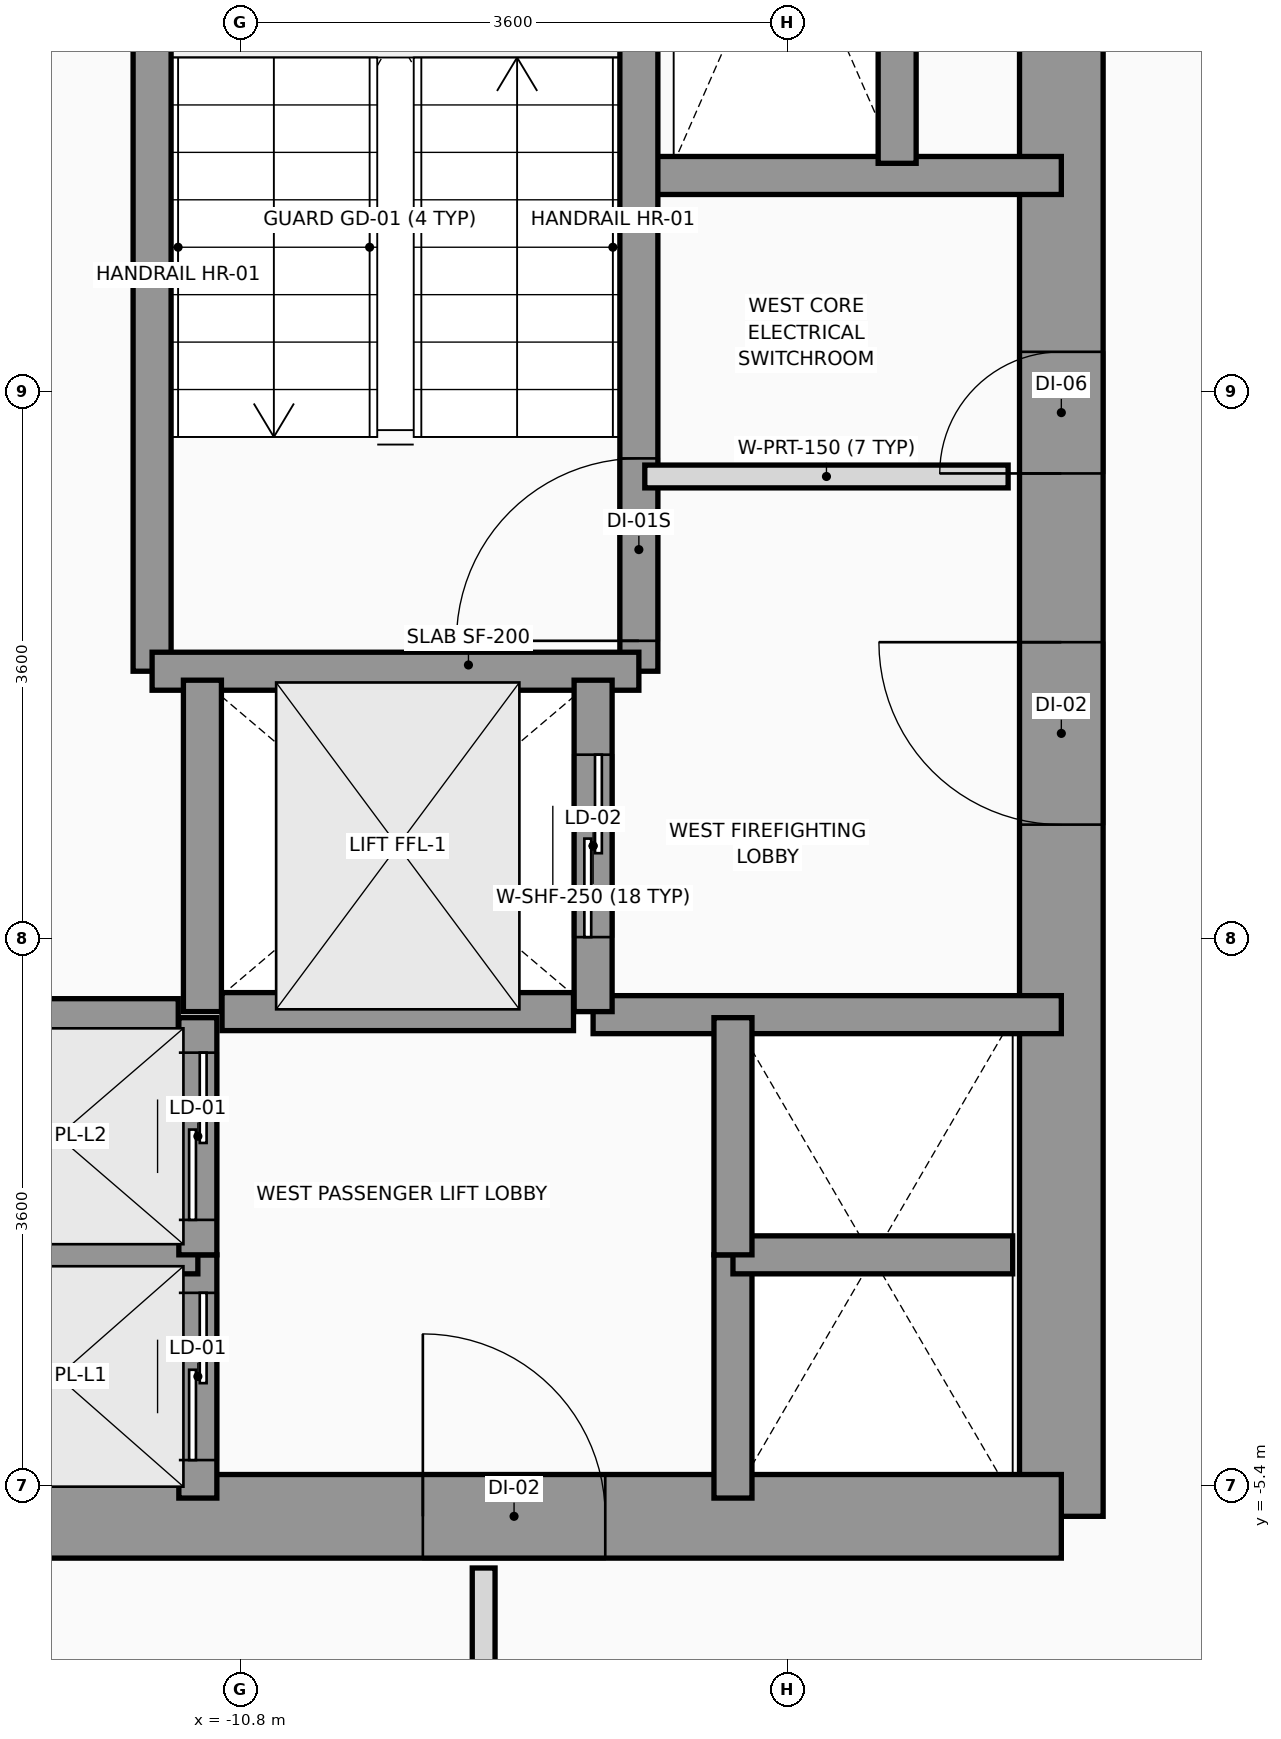
"""IFC4 building model, lengths in metres.
Left out: names, types, materials, properties, quantities, classifications, styles, units other than length and angle.
Written with IfcOpenShell. Run it as: python <this file> out.ifc"""

import sys

from ifc_helpers import new_model, si_unit, direction, frame, frame_2d, origin, place, context, subcontext, project, spatial, rectangle, extrude, source, transform, mapped, element, fill, save


model = new_model("IFC4")
c1 = context("Model", 3, precision=1e-05, world=origin(), true_north=direction((0.0, 1.0)))
c2 = subcontext(c1, "Body", "Model", "MODEL_VIEW")
j1 = project(units=[si_unit("LENGTHUNIT", "METRE"), si_unit("PLANEANGLEUNIT", "RADIAN")], contexts=[c1])
p1 = place(None, origin())
s1 = spatial("IfcSite", under=j1, at=p1, CompositionType="ELEMENT")
p2 = place(p1, origin())
s2 = spatial("IfcBuilding", under=s1, at=p2, CompositionType="ELEMENT")
p3 = place(p2, frame((0.0, 0.0, 30.6)))
s3 = spatial("IfcBuildingStorey", under=s2, at=p3, CompositionType="ELEMENT", Elevation=30.6)
p4 = place(p3, frame((-5.4, -5.6, 0.0), z_axis=(0.0, 0.0, 1.0), x_axis=(0.0, 1.0, 0.0)))
e1 = element("IfcWall", 1, at=p4, inside=s3, PredefinedType="SHEAR", context=c2, shape_type="SweptSolid", body=[
    extrude(rectangle(XDim=12.5, YDim=0.55, at=frame_2d((6.25, 0.0))), origin(), (0.0, 0.0, 1.0), 3.2),
])
p5 = place(p4, frame((4.55, 0.0, 0.0)))
e2 = element("IfcOpeningElement", 2, at=p5, cuts=e1, PredefinedType="OPENING", context=c2, shape_type="SweptSolid", body=[
    extrude(rectangle(XDim=1.2, YDim=2.2, at=frame_2d((0.6, 1.1))), frame((0.0, 0.285, 0.0), z_axis=(0.0, -1.0, 0.0), x_axis=(1.0, 0.0, 0.0)), (0.0, 0.0, 1.0), 0.57),
])
p6 = place(p4, frame((6.86, 0.0, 0.0)))
e3 = element("IfcOpeningElement", 3, at=p6, cuts=e1, PredefinedType="OPENING", context=c2, shape_type="SweptSolid", body=[
    extrude(rectangle(XDim=0.8, YDim=2.1, at=frame_2d((0.4, 1.05))), frame((0.0, 0.285, 0.0), z_axis=(0.0, -1.0, 0.0), x_axis=(1.0, 0.0, 0.0)), (0.0, 0.0, 1.0), 0.57),
])
p7 = place(p3, frame((-13.2, -5.6, 0.0), z_axis=(0.0, 0.0, 1.0), x_axis=(1.0, 0.0, 0.0)))
e4 = element("IfcWall", 4, at=p7, inside=s3, PredefinedType="SHEAR", context=c2, shape_type="SweptSolid", body=[
    extrude(rectangle(XDim=7.8, YDim=0.55, at=frame_2d((3.9, 0.0))), origin(), (0.0, 0.0, 1.0), 3.2),
])
p8 = place(p7, frame((3.6, 0.0, 0.0)))
e5 = element("IfcOpeningElement", 5, at=p8, cuts=e4, PredefinedType="OPENING", context=c2, shape_type="SweptSolid", body=[
    extrude(rectangle(XDim=1.2, YDim=2.2, at=frame_2d((0.6, 1.1))), frame((0.0, 0.285, 0.0), z_axis=(0.0, -1.0, 0.0), x_axis=(1.0, 0.0, 0.0)), (0.0, 0.0, 1.0), 0.57),
])
p9 = place(p3, frame((-8.18, 3.22, 0.0), z_axis=(0.0, 0.0, 1.0), x_axis=(1.0, 0.0, 0.0)))
e6 = element("IfcWall", 6, at=p9, inside=s3, PredefinedType="SOLIDWALL", context=c2, shape_type="SweptSolid", body=[
    extrude(rectangle(XDim=2.78, YDim=0.25, at=frame_2d((1.39, 0.0))), origin(), (0.0, 0.0, 1.0), 3.2),
])
p10 = place(p3, frame((-8.48, -2.3, 0.0), z_axis=(0.0, 0.0, 1.0), x_axis=(1.0, 0.0, 0.0)))
e7 = element("IfcWall", 7, at=p10, inside=s3, PredefinedType="SOLIDWALL", context=c2, shape_type="SweptSolid", body=[
    extrude(rectangle(XDim=3.08, YDim=0.25, at=frame_2d((1.54, 0.0))), origin(), (0.0, 0.0, 1.0), 3.2),
])
p11 = place(p3, frame((-8.179, -0.041, 0.0), z_axis=(0.0, 0.0, 1.0), x_axis=(0.0, 1.0, 0.0)))
e8 = element("IfcWall", 8, at=p11, inside=s3, PredefinedType="SOLIDWALL", context=c2, shape_type="SweptSolid", body=[
    extrude(rectangle(XDim=6.941, YDim=0.25, at=frame_2d((3.47, 0.0))), origin(), (0.0, 0.0, 1.0), 3.2),
])
p12 = place(p11, frame((0.2, 0.0, 0.0)))
e9 = element("IfcOpeningElement", 9, at=p12, cuts=e8, PredefinedType="OPENING", context=c2, shape_type="SweptSolid", body=[
    extrude(rectangle(XDim=1.2, YDim=2.2, at=frame_2d((0.6, 1.1))), frame((0.0, 0.135, 0.0), z_axis=(0.0, -1.0, 0.0), x_axis=(1.0, 0.0, 0.0)), (0.0, 0.0, 1.0), 0.27),
])
p13 = place(p3, frame((-11.381, -0.041, 0.0), z_axis=(0.0, 0.0, 1.0), x_axis=(0.0, 1.0, 0.0)))
e10 = element("IfcWall", 10, at=p13, inside=s3, PredefinedType="SOLIDWALL", context=c2, shape_type="SweptSolid", body=[
    extrude(rectangle(XDim=6.941, YDim=0.25, at=frame_2d((3.47, 0.0))), origin(), (0.0, 0.0, 1.0), 3.2),
])
p14 = place(p3, frame((-11.381, -0.041, 0.0), z_axis=(0.0, 0.0, 1.0), x_axis=(1.0, 0.0, 0.0)))
e11 = element("IfcWall", 11, at=p14, inside=s3, PredefinedType="SOLIDWALL", context=c2, shape_type="SweptSolid", body=[
    extrude(rectangle(XDim=3.202, YDim=0.25, at=frame_2d((1.601, 0.0))), origin(), (0.0, 0.0, 1.0), 3.2),
])
p15 = place(p3, frame((-11.05, -2.28, 0.0), z_axis=(0.0, 0.0, 1.0), x_axis=(0.0, 1.0, 0.0)))
e12 = element("IfcWall", 12, at=p15, inside=s3, PredefinedType="SOLIDWALL", context=c2, shape_type="SweptSolid", body=[
    extrude(rectangle(XDim=2.18, YDim=0.25, at=frame_2d((1.09, 0.0))), origin(), (0.0, 0.0, 1.0), 3.2),
])
p16 = place(p3, frame((-8.48, -2.28, 0.0), z_axis=(0.0, 0.0, 1.0), x_axis=(0.0, 1.0, 0.0)))
e13 = element("IfcWall", 13, at=p16, inside=s3, PredefinedType="SOLIDWALL", context=c2, shape_type="SweptSolid", body=[
    extrude(rectangle(XDim=2.18, YDim=0.25, at=frame_2d((1.09, 0.0))), origin(), (0.0, 0.0, 1.0), 3.2),
])
p17 = place(p16, frame((0.49, 0.0, 0.0)))
e14 = element("IfcOpeningElement", 14, at=p17, cuts=e13, PredefinedType="OPENING", context=c2, shape_type="SweptSolid", body=[
    extrude(rectangle(XDim=1.2, YDim=2.2, at=frame_2d((0.6, 1.1))), frame((0.0, 0.135, 0.0), z_axis=(0.0, -1.0, 0.0), x_axis=(1.0, 0.0, 0.0)), (0.0, 0.0, 1.0), 0.27),
])
p18 = place(p3, frame((-10.921, -2.28, 0.0), z_axis=(0.0, 0.0, 1.0), x_axis=(1.0, 0.0, 0.0)))
e15 = element("IfcWall", 15, at=p18, inside=s3, PredefinedType="SOLIDWALL", context=c2, shape_type="SweptSolid", body=[
    extrude(rectangle(XDim=2.312, YDim=0.25, at=frame_2d((1.156, 0.0))), origin(), (0.0, 0.0, 1.0), 3.2),
])
p19 = place(p3, frame((-11.08, -5.48, 0.0), z_axis=(0.0, 0.0, 1.0), x_axis=(0.0, 1.0, 0.0)))
e16 = element("IfcWall", 16, at=p19, inside=s3, PredefinedType="SOLIDWALL", context=c2, shape_type="SweptSolid", body=[
    extrude(rectangle(XDim=1.6, YDim=0.25, at=frame_2d((0.8, 0.0))), origin(), (0.0, 0.0, 1.0), 3.2),
])
p20 = place(p19, frame((0.25, 0.0, 0.0)))
e17 = element("IfcOpeningElement", 17, at=p20, cuts=e16, PredefinedType="OPENING", context=c2, shape_type="SweptSolid", body=[
    extrude(rectangle(XDim=1.1, YDim=2.2, at=frame_2d((0.55, 1.1))), frame((0.0, 0.135, 0.0), z_axis=(0.0, -1.0, 0.0), x_axis=(1.0, 0.0, 0.0)), (0.0, 0.0, 1.0), 0.27),
])
p21 = place(p3, frame((-12.92, -3.88, 0.0), z_axis=(0.0, 0.0, 1.0), x_axis=(1.0, 0.0, 0.0)))
e18 = element("IfcWall", 18, at=p21, inside=s3, PredefinedType="SOLIDWALL", context=c2, shape_type="SweptSolid", body=[
    extrude(rectangle(XDim=1.84, YDim=0.25, at=frame_2d((0.92, 0.0))), origin(), (0.0, 0.0, 1.0), 3.2),
])
p22 = place(p3, frame((-11.08, -3.88, 0.0), z_axis=(0.0, 0.0, 1.0), x_axis=(0.0, 1.0, 0.0)))
e19 = element("IfcWall", 19, at=p22, inside=s3, PredefinedType="SOLIDWALL", context=c2, shape_type="SweptSolid", body=[
    extrude(rectangle(XDim=1.56, YDim=0.25, at=frame_2d((0.78, 0.0))), origin(), (0.0, 0.0, 1.0), 3.2),
])
p23 = place(p22, frame((0.23, 0.0, 0.0)))
e20 = element("IfcOpeningElement", 20, at=p23, cuts=e19, PredefinedType="OPENING", context=c2, shape_type="SweptSolid", body=[
    extrude(rectangle(XDim=1.1, YDim=2.2, at=frame_2d((0.55, 1.1))), frame((0.0, 0.135, 0.0), z_axis=(0.0, -1.0, 0.0), x_axis=(1.0, 0.0, 0.0)), (0.0, 0.0, 1.0), 0.27),
])
p24 = place(p3, frame((-12.791, -2.32, 0.0), z_axis=(0.0, 0.0, 1.0), x_axis=(1.0, 0.0, 0.0)))
e21 = element("IfcWall", 21, at=p24, inside=s3, PredefinedType="SOLIDWALL", context=c2, shape_type="SweptSolid", body=[
    extrude(rectangle(XDim=1.582, YDim=0.25, at=frame_2d((0.791, 0.0))), origin(), (0.0, 0.0, 1.0), 3.2),
])
p25 = place(p3, frame((-7.56, -5.48, 0.0), z_axis=(0.0, 0.0, 1.0), x_axis=(0.0, 1.0, 0.0)))
e22 = element("IfcWall", 22, at=p25, inside=s3, PredefinedType="SOLIDWALL", context=c2, shape_type="SweptSolid", body=[
    extrude(rectangle(XDim=1.6, YDim=0.25, at=frame_2d((0.8, 0.0))), origin(), (0.0, 0.0, 1.0), 3.2),
])
p26 = place(p3, frame((-7.56, -3.88, 0.0), z_axis=(0.0, 0.0, 1.0), x_axis=(1.0, 0.0, 0.0)))
e23 = element("IfcWall", 23, at=p26, inside=s3, PredefinedType="SOLIDWALL", context=c2, shape_type="SweptSolid", body=[
    extrude(rectangle(XDim=1.84, YDim=0.25, at=frame_2d((0.92, 0.0))), origin(), (0.0, 0.0, 1.0), 3.2),
])
p27 = place(p3, frame((-7.56, -3.88, 0.0), z_axis=(0.0, 0.0, 1.0), x_axis=(0.0, 1.0, 0.0)))
e24 = element("IfcWall", 24, at=p27, inside=s3, PredefinedType="SOLIDWALL", context=c2, shape_type="SweptSolid", body=[
    extrude(rectangle(XDim=1.56, YDim=0.25, at=frame_2d((0.78, 0.0))), origin(), (0.0, 0.0, 1.0), 3.2),
])
p28 = place(p3, frame((-6.48, 3.3, 0.0), z_axis=(0.0, 0.0, 1.0), x_axis=(0.0, 1.0, 0.0)))
e25 = element("IfcWall", 25, at=p28, inside=s3, PredefinedType="SOLIDWALL", context=c2, shape_type="SweptSolid", body=[
    extrude(rectangle(XDim=1.68, YDim=0.25, at=frame_2d((0.84, 0.0))), origin(), (0.0, 0.0, 1.0), 3.2),
])
p29 = place(p3, frame((-8.14, 1.24, 0.0), z_axis=(0.0, 0.0, 1.0), x_axis=(1.0, 0.0, 0.0)))
e26 = element("IfcWall", 26, at=p29, inside=s3, PredefinedType="PARTITIONING", context=c2, shape_type="SweptSolid", body=[
    extrude(rectangle(XDim=2.39, YDim=0.15, at=frame_2d((1.195, 0.0))), origin(), (0.0, 0.0, 1.0), 2.3),
])
p30 = place(p3, frame((-9.2, -15.68, 0.0), z_axis=(0.0, 0.0, 1.0), x_axis=(0.0, 1.0, 0.0)))
e27 = element("IfcWall", 27, at=p30, inside=s3, PredefinedType="PARTITIONING", context=c2, shape_type="SweptSolid", body=[
    extrude(rectangle(XDim=9.74, YDim=0.15, at=frame_2d((4.87, 0.0))), origin(), (0.0, 0.0, 1.0), 2.65),
])
m1 = source(origin(), c2, "Body", "SweptSolid", [
    extrude(rectangle(XDim=1.2, YDim=2.2, at=frame_2d((0.6, 1.1))), frame((0.0, 0.025, 0.0), z_axis=(0.0, -1.0, 0.0), x_axis=(1.0, 0.0, 0.0)), (0.0, 0.0, 1.0), 0.05),
])
p31 = place(p12, origin())
e28 = element("IfcDoor", 28, at=p31, inside=s3, OperationType="SINGLE_SWING_LEFT", PredefinedType="DOOR", context=c2, shape_type="MappedRepresentation", body=[
    mapped(m1, transform((0.0, 0.0, 0.0), x_axis=(1.0, 0.0, 0.0), y_axis=(0.0, 1.0, 0.0), z_axis=(0.0, 0.0, 1.0), scale=1.0)),
])
fill(e9, e28)
p32 = place(p5, origin())
e29 = element("IfcDoor", 29, at=p32, inside=s3, OperationType="SINGLE_SWING_RIGHT", PredefinedType="DOOR", context=c2, shape_type="MappedRepresentation", body=[
    mapped(m1, transform((0.0, 0.0, 0.0), x_axis=(1.0, 0.0, 0.0), y_axis=(0.0, 1.0, 0.0), z_axis=(0.0, 0.0, 1.0), scale=1.0)),
])
fill(e2, e29)
p33 = place(p8, origin())
e30 = element("IfcDoor", 30, at=p33, inside=s3, OperationType="SINGLE_SWING_LEFT", PredefinedType="DOOR", context=c2, shape_type="MappedRepresentation", body=[
    mapped(m1, transform((0.0, 0.0, 0.0), x_axis=(1.0, 0.0, 0.0), y_axis=(0.0, 1.0, 0.0), z_axis=(0.0, 0.0, 1.0), scale=1.0)),
])
fill(e5, e30)
m2 = source(origin(), c2, "Body", "SweptSolid", [
    extrude(rectangle(XDim=0.8, YDim=2.1, at=frame_2d((0.4, 1.05))), frame((0.0, 0.025, 0.0), z_axis=(0.0, -1.0, 0.0), x_axis=(1.0, 0.0, 0.0)), (0.0, 0.0, 1.0), 0.05),
])
p34 = place(p6, origin())
e31 = element("IfcDoor", 31, at=p34, inside=s3, OperationType="SINGLE_SWING_LEFT", PredefinedType="DOOR", context=c2, shape_type="MappedRepresentation", body=[
    mapped(m2, transform((0.0, 0.0, 0.0), x_axis=(1.0, 0.0, 0.0), y_axis=(0.0, 1.0, 0.0), z_axis=(0.0, 0.0, 1.0), scale=1.0)),
])
fill(e3, e31)
p35 = place(p17, origin())
e32 = element("IfcDoor", 32, at=p35, inside=s3, OperationType="SLIDING_TO_RIGHT", PredefinedType="DOOR", context=c2, shape_type="MappedRepresentation", body=[
    mapped(m1, transform((0.0, 0.0, 0.0), x_axis=(1.0, 0.0, 0.0), y_axis=(0.0, 1.0, 0.0), z_axis=(0.0, 0.0, 1.0), scale=1.0)),
])
fill(e14, e32)
m3 = source(origin(), c2, "Body", "SweptSolid", [
    extrude(rectangle(XDim=1.1, YDim=2.2, at=frame_2d((0.55, 1.1))), frame((0.0, 0.025, 0.0), z_axis=(0.0, -1.0, 0.0), x_axis=(1.0, 0.0, 0.0)), (0.0, 0.0, 1.0), 0.05),
])
p36 = place(p20, origin())
e33 = element("IfcDoor", 33, at=p36, inside=s3, OperationType="SLIDING_TO_LEFT", PredefinedType="DOOR", context=c2, shape_type="MappedRepresentation", body=[
    mapped(m3, transform((0.0, 0.0, 0.0), x_axis=(1.0, 0.0, 0.0), y_axis=(0.0, 1.0, 0.0), z_axis=(0.0, 0.0, 1.0), scale=1.0)),
])
fill(e17, e33)
p37 = place(p23, origin())
e34 = element("IfcDoor", 34, at=p37, inside=s3, OperationType="SLIDING_TO_LEFT", PredefinedType="DOOR", context=c2, shape_type="MappedRepresentation", body=[
    mapped(m3, transform((0.0, 0.0, 0.0), x_axis=(1.0, 0.0, 0.0), y_axis=(0.0, 1.0, 0.0), z_axis=(0.0, 0.0, 1.0), scale=1.0)),
])
fill(e20, e34)
save(model, sys.argv[1])
